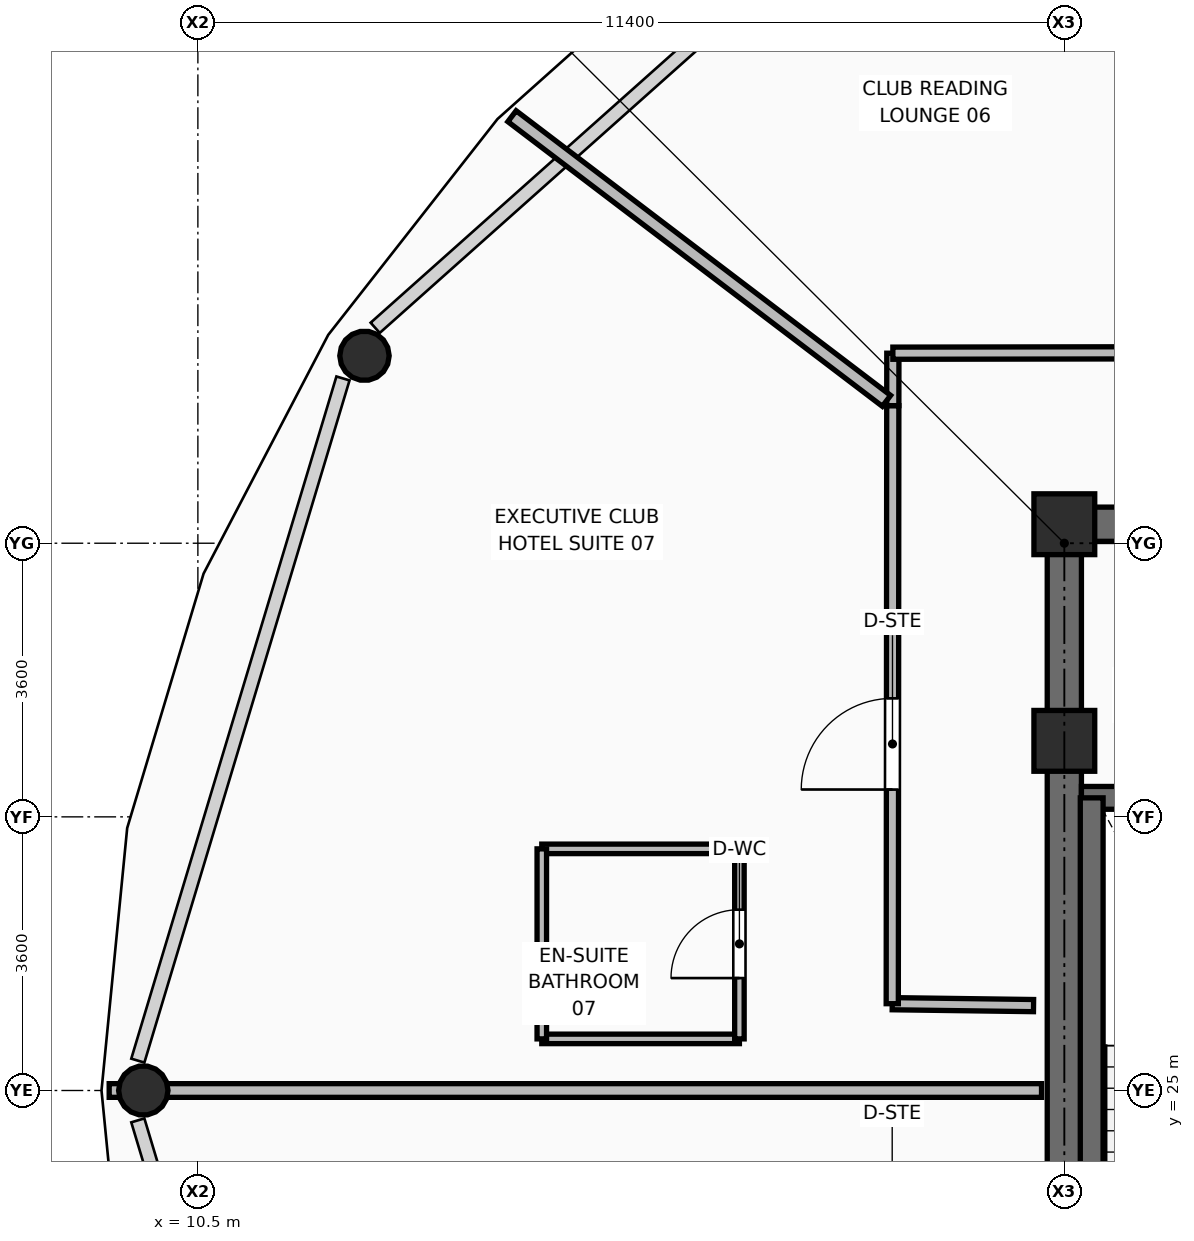
"""IFC4 building model, lengths in metres.
Left out: names, types, materials, properties, quantities, classifications, styles, units other than length and angle.
Written with IfcOpenShell. Run it as: python <this file> out.ifc"""

import sys

from ifc_helpers import new_model, si_unit, direction, frame, frame_2d, origin, origin_2d, place, context, subcontext, project, spatial, rectangle, hollow_circle, extrude, element, fill, save


model = new_model("IFC4")
c1 = context("Model", 3, precision=1e-05, world=origin(), true_north=direction((0.0, 1.0)))
c2 = subcontext(c1, "Body", "Model", "MODEL_VIEW")
j1 = project(units=[si_unit("LENGTHUNIT", "METRE"), si_unit("PLANEANGLEUNIT", "RADIAN")], contexts=[c1])
p1 = place(None, origin())
s1 = spatial("IfcSite", under=j1, at=p1, CompositionType="ELEMENT")
p2 = place(p1, origin())
s2 = spatial("IfcBuilding", under=s1, at=p2, CompositionType="ELEMENT")
p3 = place(p2, frame((0.0, 0.0, 249.9)))
s3 = spatial("IfcBuildingStorey", under=s2, at=p3, CompositionType="ELEMENT", Elevation=249.9)
for number, where, z_axis, x_axis in (
    (1, (21.9, 29.6, 0.0), (0.0, 0.0, 1.0), (1.0, 0.0, 0.0)),
    (2, (21.9, 32.45, 0.0), (0.0, 0.0, 1.0), (1.0, 0.0, 0.0)),
):
    element("IfcColumn", number, at=place(p3, frame(where, z_axis=z_axis, x_axis=x_axis)), inside=s3, PredefinedType="COLUMN", context=c2, shape_type="SweptSolid", body=[
        extrude(rectangle(XDim=0.8, YDim=0.8, at=origin_2d()), origin(), (0.0, 0.0, 1.0), 3.75),
    ])
p4 = place(p3, frame((12.692, 34.666, 0.0), z_axis=(0.09041848627, -0.04663179031, 0.994811526608), x_axis=(0.458364904761, 0.888764093606, 0.0)))
e3 = element("IfcColumn", 3, at=p4, inside=s3, PredefinedType="COLUMN", context=c2, shape_type="SweptSolid", body=[
    extrude(hollow_circle(Radius=0.325, WallThickness=0.03, at=origin_2d()), origin(), (0.0, 0.0, 1.0), 3.518),
])
p5 = place(p3, frame((9.782, 25.0, 0.0), z_axis=(0.104543948341, 0.0, 0.9945202677), x_axis=(0.0, 1.0, 0.0)))
e4 = element("IfcColumn", 4, at=p5, inside=s3, PredefinedType="COLUMN", context=c2, shape_type="SweptSolid", body=[
    extrude(hollow_circle(Radius=0.325, WallThickness=0.03, at=origin_2d()), origin(), (0.0, 0.0, 1.0), 3.519),
])
p6 = place(p3, frame((21.675, 32.45, 0.0), z_axis=(0.0, 0.0, 1.0), x_axis=(1.0, 0.0, 0.0)))
e5 = element("IfcWall", 5, at=p6, inside=s3, PredefinedType="SHEAR", context=c2, shape_type="SweptSolid", body=[
    extrude(rectangle(XDim=19.65, YDim=0.45, at=frame_2d((9.825, 0.0))), origin(), (0.0, 0.0, 1.0), 3.5),
])
p7 = place(p6, frame((2.075, 0.0, 0.0)))
e6 = element("IfcOpeningElement", 6, at=p7, cuts=e5, PredefinedType="OPENING", context=c2, shape_type="SweptSolid", body=[
    extrude(rectangle(XDim=1.1, YDim=2.1, at=frame_2d((0.55, 1.05))), frame((0.0, 0.235, 0.0), z_axis=(0.0, -1.0, 0.0), x_axis=(1.0, 0.0, 0.0)), (0.0, 0.0, 1.0), 0.47),
])
p8 = place(p6, frame((15.465, 0.0, 0.0)))
e7 = element("IfcOpeningElement", 7, at=p8, cuts=e5, PredefinedType="OPENING", context=c2, shape_type="SweptSolid", body=[
    extrude(rectangle(XDim=1.0, YDim=2.1, at=frame_2d((0.5, 1.05))), frame((0.0, 0.235, 0.0), z_axis=(0.0, -1.0, 0.0), x_axis=(1.0, 0.0, 0.0)), (0.0, 0.0, 1.0), 0.47),
])
p9 = place(p6, frame((17.475, 0.0, 0.0)))
e8 = element("IfcOpeningElement", 8, at=p9, cuts=e5, PredefinedType="OPENING", context=c2, shape_type="SweptSolid", body=[
    extrude(rectangle(XDim=0.9, YDim=2.1, at=frame_2d((0.45, 1.05))), frame((0.0, 0.235, 0.0), z_axis=(0.0, -1.0, 0.0), x_axis=(1.0, 0.0, 0.0)), (0.0, 0.0, 1.0), 0.47),
])
p10 = place(p3, frame((21.9, 18.025, 0.0), z_axis=(0.0, 0.0, 1.0), x_axis=(0.0, 1.0, 0.0)))
e9 = element("IfcWall", 9, at=p10, inside=s3, PredefinedType="SHEAR", context=c2, shape_type="SweptSolid", body=[
    extrude(rectangle(XDim=14.2, YDim=0.45, at=frame_2d((7.1, 0.0))), origin(), (0.0, 0.0, 1.0), 3.5),
])
p11 = place(p3, frame((22.125, 28.85, 0.0), z_axis=(0.0, 0.0, 1.0), x_axis=(1.0, 0.0, 0.0)))
e10 = element("IfcWall", 10, at=p11, inside=s3, PredefinedType="SHEAR", context=c2, shape_type="SweptSolid", body=[
    extrude(rectangle(XDim=3.615, YDim=0.3, at=frame_2d((1.808, 0.0))), origin(), (0.0, 0.0, 1.0), 3.5),
])
p12 = place(p3, frame((22.26, 21.1, 0.0), z_axis=(0.0, 0.0, 1.0), x_axis=(0.0, 1.0, 0.0)))
e11 = element("IfcWall", 11, at=p12, inside=s3, PredefinedType="SHEAR", context=c2, shape_type="SweptSolid", body=[
    extrude(rectangle(XDim=7.75, YDim=0.3, at=frame_2d((3.875, 0.0))), origin(), (0.0, 0.0, 1.0), 3.5),
])
p13 = place(p3, frame((21.495, 26.117, 0.0), z_axis=(0.0, 0.0, 1.0), x_axis=(-0.999908537082, 0.013524698532, 0.0)))
e12 = element("IfcWall", 12, at=p13, inside=s3, PredefinedType="PARTITIONING", context=c2, shape_type="SweptSolid", body=[
    extrude(rectangle(XDim=1.859, YDim=0.16, at=frame_2d((0.93, 0.0))), origin(), (0.0, 0.0, 1.0), 2.525),
])
p14 = place(p3, frame((19.636, 26.142, 0.0), z_axis=(0.0, 0.0, 1.0), x_axis=(0.000899866207, 0.99999959512, 0.0)))
e13 = element("IfcWall", 13, at=p14, inside=s3, PredefinedType="PARTITIONING", context=c2, shape_type="SweptSolid", body=[
    extrude(rectangle(XDim=7.868, YDim=0.16, at=frame_2d((3.934, 0.0))), origin(), (0.0, 0.0, 1.0), 3.012),
])
p15 = place(p14, frame((2.817, 0.0, 0.0)))
e14 = element("IfcOpeningElement", 14, at=p15, cuts=e13, PredefinedType="OPENING", context=c2, shape_type="SweptSolid", body=[
    extrude(rectangle(XDim=1.2, YDim=2.1, at=frame_2d((0.6, 1.05))), frame((0.0, 0.09, 0.0), z_axis=(0.0, -1.0, 0.0), x_axis=(1.0, 0.0, 0.0)), (0.0, 0.0, 1.0), 0.18),
])
p16 = place(p3, frame((19.643, 34.01, 0.0), z_axis=(0.0, 0.0, 1.0), x_axis=(0.001415426749, 0.999998998283, 0.0)))
e15 = element("IfcWall", 15, at=p16, inside=s3, PredefinedType="PARTITIONING", context=c2, shape_type="SweptSolid", body=[
    extrude(rectangle(XDim=0.69, YDim=0.16, at=frame_2d((0.345, 0.0))), origin(), (0.0, 0.0, 1.0), 3.48),
])
p17 = place(p3, frame((19.644, 34.7, 0.0), z_axis=(0.0, 0.0, 1.0), x_axis=(0.999998923057, 0.001467611763, 0.0)))
e16 = element("IfcWall", 16, at=p17, inside=s3, PredefinedType="PARTITIONING", context=c2, shape_type="SweptSolid", body=[
    extrude(rectangle(XDim=6.155, YDim=0.16, at=frame_2d((3.078, 0.0))), origin(), (0.0, 0.0, 1.0), 3.012),
])
p18 = place(p17, frame((4.346, 0.0, 0.0)))
e17 = element("IfcOpeningElement", 17, at=p18, cuts=e16, PredefinedType="OPENING", context=c2, shape_type="SweptSolid", body=[
    extrude(rectangle(XDim=1.2, YDim=2.1, at=frame_2d((0.6, 1.05))), frame((0.0, 0.09, 0.0), z_axis=(0.0, -1.0, 0.0), x_axis=(1.0, 0.0, 0.0)), (0.0, 0.0, 1.0), 0.18),
])
p19 = place(p3, frame((25.752, 34.79, 0.0), z_axis=(0.0, 0.0, 1.0), x_axis=(-0.50634586345, 0.8623304857, 0.0)))
e18 = element("IfcWall", 18, at=p19, inside=s3, PredefinedType="PARTITIONING", context=c2, shape_type="SweptSolid", body=[
    extrude(rectangle(XDim=8.911, YDim=0.18, at=frame_2d((4.456, 0.0))), origin(), (0.0, 0.0, 1.0), 2.855),
])
p20 = place(p3, frame((19.56, 34.073, 0.0), z_axis=(0.0, 0.0, 1.0), x_axis=(-0.796115821465, 0.605144279336, 0.0)))
e19 = element("IfcWall", 19, at=p20, inside=s3, PredefinedType="PARTITIONING", context=c2, shape_type="SweptSolid", body=[
    extrude(rectangle(XDim=6.189, YDim=0.18, at=frame_2d((3.094, 0.0))), origin(), (0.0, 0.0, 1.0), 2.855),
])
p21 = place(p3, frame((21.6, 25.0, 0.0), z_axis=(0.0, 0.0, 1.0), x_axis=(-1.0, 0.0, 0.0)))
e20 = element("IfcWall", 20, at=p21, inside=s3, PredefinedType="PARTITIONING", context=c2, shape_type="SweptSolid", body=[
    extrude(rectangle(XDim=12.267, YDim=0.18, at=frame_2d((6.134, 0.0))), origin(), (0.0, 0.0, 1.0), 2.525),
])
for number, where, z_axis, x_axis in (
    (21, (15.025, 25.679, 0.0), (0.0, 0.0, 1.0), (1.0, 0.0, 0.0)),
    (22, (15.025, 28.179, 0.0), (0.0, 0.0, 1.0), (1.0, 0.0, 0.0)),
):
    element("IfcWall", number, at=place(p3, frame(where, z_axis=z_axis, x_axis=x_axis)), inside=s3, PredefinedType="PARTITIONING", context=c2, shape_type="SweptSolid", body=[
        extrude(rectangle(XDim=2.6, YDim=0.125, at=frame_2d((1.3, 0.0))), origin(), (0.0, 0.0, 1.0), 3.48),
    ])
p22 = place(p3, frame((15.025, 25.679, 0.0), z_axis=(0.0, 0.0, 1.0), x_axis=(0.0, 1.0, 0.0)))
e23 = element("IfcWall", 23, at=p22, inside=s3, PredefinedType="PARTITIONING", context=c2, shape_type="SweptSolid", body=[
    extrude(rectangle(XDim=2.5, YDim=0.125, at=frame_2d((1.25, 0.0))), origin(), (0.0, 0.0, 1.0), 3.48),
])
p23 = place(p3, frame((17.625, 25.679, 0.0), z_axis=(0.0, 0.0, 1.0), x_axis=(0.0, 1.0, 0.0)))
e24 = element("IfcWall", 24, at=p23, inside=s3, PredefinedType="PARTITIONING", context=c2, shape_type="SweptSolid", body=[
    extrude(rectangle(XDim=2.5, YDim=0.125, at=frame_2d((1.25, 0.0))), origin(), (0.0, 0.0, 1.0), 3.48),
])
p24 = place(p23, frame((0.8, 0.0, 0.0)))
e25 = element("IfcOpeningElement", 25, at=p24, cuts=e24, PredefinedType="OPENING", context=c2, shape_type="SweptSolid", body=[
    extrude(rectangle(XDim=0.9, YDim=2.1, at=frame_2d((0.45, 1.05))), frame((0.0, 0.073, 0.0), z_axis=(0.0, -1.0, 0.0), x_axis=(1.0, 0.0, 0.0)), (0.0, 0.0, 1.0), 0.145),
])
p25 = place(p24, origin())
e26 = element("IfcDoor", 26, at=p25, inside=s3, OperationType="SINGLE_SWING_LEFT", PredefinedType="DOOR", context=c2, shape_type="SweptSolid", body=[
    extrude(rectangle(XDim=0.9, YDim=2.1, at=frame_2d((0.45, 1.05))), frame((0.0, 0.025, 0.0), z_axis=(0.0, -1.0, 0.0), x_axis=(1.0, 0.0, 0.0)), (0.0, 0.0, 1.0), 0.05),
])
fill(e25, e26)
p26 = place(p15, origin())
e27 = element("IfcDoor", 27, at=p26, inside=s3, OperationType="SINGLE_SWING_LEFT", PredefinedType="DOOR", context=c2, shape_type="SweptSolid", body=[
    extrude(rectangle(XDim=1.2, YDim=2.1, at=frame_2d((0.6, 1.05))), frame((0.0, 0.025, 0.0), z_axis=(0.0, -1.0, 0.0), x_axis=(1.0, 0.0, 0.0)), (0.0, 0.0, 1.0), 0.05),
])
fill(e14, e27)
save(model, sys.argv[1])
